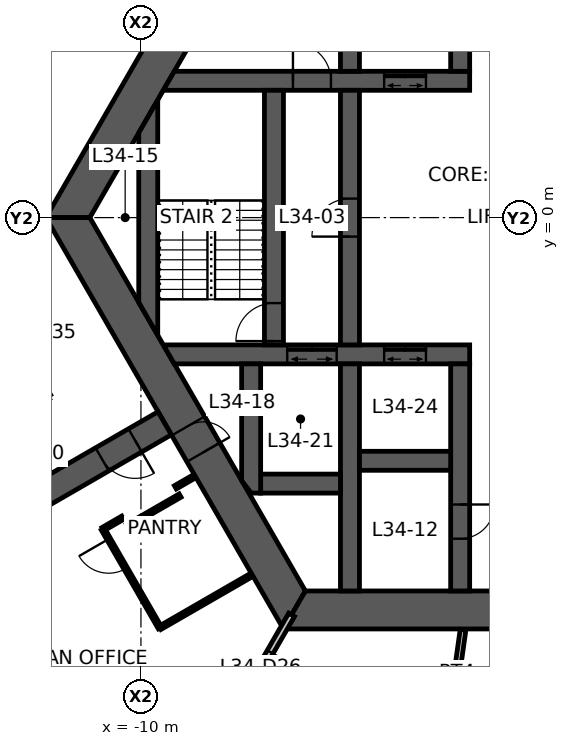
"""IFC4 building model, lengths in metres.
Left out: names, types, materials, properties, quantities, classifications, styles, units other than length and angle.
Written with IfcOpenShell. Run it as: python <this file> out.ifc"""

import sys

from ifc_helpers import new_model, si_unit, direction, frame, frame_2d, origin, place, context, subcontext, project, spatial, polyline, rectangle, outline, extrude, element, fill, save


model = new_model("IFC4")
c1 = context("Model", 3, precision=1e-05, world=origin(), true_north=direction((0.0, 1.0)))
c2 = subcontext(c1, "Body", "Model", "MODEL_VIEW")
j1 = project(units=[si_unit("LENGTHUNIT", "METRE"), si_unit("PLANEANGLEUNIT", "RADIAN")], contexts=[c1])
p1 = place(None, origin())
s1 = spatial("IfcSite", under=j1, at=p1, CompositionType="ELEMENT")
p2 = place(p1, origin())
s2 = spatial("IfcBuilding", under=s1, at=p2, CompositionType="ELEMENT")
p3 = place(p2, frame((0.0, 0.0, 137.0)))
s3 = spatial("IfcBuildingStorey", under=s2, at=p3, CompositionType="ELEMENT", Elevation=137.0)
p4 = place(p3, frame((-5.961, 10.325, 0.0), z_axis=(0.0, 0.0, 1.0), x_axis=(-0.500004296715, -0.866022923061, 0.0)))
e1 = element("IfcWall", 1, at=p4, inside=s3, PredefinedType="SHEAR", context=c2, shape_type="SweptSolid", body=[
    extrude(outline(polyline([(-0.289, -0.5), (4.494, -0.5), (5.494, -0.5), (12.211, -0.5), (11.634, 0.5), (5.494, 0.5), (4.494, 0.5), (0.289, 0.5), (-0.289, -0.5)])), origin(), (0.0, 0.0, 1.0), 3.9),
])
p5 = place(p4, frame((4.494, 0.0, 0.0)))
e2 = element("IfcOpeningElement", 2, at=p5, cuts=e1, PredefinedType="OPENING", context=c2, shape_type="SweptSolid", body=[
    extrude(rectangle(XDim=1.0, YDim=2.1, at=frame_2d((0.5, 1.05))), frame((0.0, 0.51, 0.0), z_axis=(0.0, -1.0, 0.0), x_axis=(1.0, 0.0, 0.0)), (0.0, 0.0, 1.0), 1.02),
])
p6 = place(p3, frame((-11.922, 0.0, 0.0), z_axis=(0.0, 0.0, 1.0), x_axis=(0.500004296715, -0.866022923061, 0.0)))
e3 = element("IfcWall", 3, at=p6, inside=s3, PredefinedType="SHEAR", context=c2, shape_type="SweptSolid", body=[
    extrude(outline(polyline([(-0.289, -0.5), (6.331, -0.5), (7.131, -0.5), (12.211, -0.5), (11.634, 0.5), (7.131, 0.5), (6.331, 0.5), (0.289, 0.5), (-0.289, -0.5)])), origin(), (0.0, 0.0, 1.0), 3.9),
])
p7 = place(p6, frame((6.331, 0.0, 0.0)))
e4 = element("IfcOpeningElement", 4, at=p7, cuts=e3, PredefinedType="OPENING", context=c2, shape_type="SweptSolid", body=[
    extrude(rectangle(XDim=0.8, YDim=2.1, at=frame_2d((0.4, 1.05))), frame((0.0, 0.51, 0.0), z_axis=(0.0, -1.0, 0.0), x_axis=(1.0, 0.0, 0.0)), (0.0, 0.0, 1.0), 1.02),
])
p8 = place(p3, frame((-5.961, -10.325, 0.0), z_axis=(0.0, 0.0, 1.0), x_axis=(1.0, 0.0, 0.0)))
e5 = element("IfcWall", 5, at=p8, inside=s3, PredefinedType="SHEAR", context=c2, shape_type="SweptSolid", body=[
    extrude(outline(polyline([(-0.289, -0.5), (5.461, -0.5), (6.461, -0.5), (12.211, -0.5), (11.634, 0.5), (6.461, 0.5), (5.461, 0.5), (0.289, 0.5), (-0.289, -0.5)])), origin(), (0.0, 0.0, 1.0), 3.9),
])
p9 = place(p8, frame((5.461, 0.0, 0.0)))
e6 = element("IfcOpeningElement", 6, at=p9, cuts=e5, PredefinedType="OPENING", context=c2, shape_type="SweptSolid", body=[
    extrude(rectangle(XDim=1.0, YDim=2.1, at=frame_2d((0.5, 1.05))), frame((0.0, 0.51, 0.0), z_axis=(0.0, -1.0, 0.0), x_axis=(1.0, 0.0, 0.0)), (0.0, 0.0, 1.0), 1.02),
])
p10 = place(p3, frame((-9.375, -5.413, 0.0), z_axis=(0.0, 0.0, 1.0), x_axis=(-0.866032377459, -0.499987921047, 0.0)))
e7 = element("IfcWall", 7, at=p10, inside=s3, PredefinedType="SHEAR", context=c2, shape_type="SweptSolid", body=[
    extrude(rectangle(XDim=7.696, YDim=0.7, at=frame_2d((3.848, 0.0))), origin(), (0.0, 0.0, 1.0), 3.9),
])
p11 = place(p10, frame((0.9, 0.0, 0.0)))
e8 = element("IfcOpeningElement", 8, at=p11, cuts=e7, PredefinedType="OPENING", context=c2, shape_type="SweptSolid", body=[
    extrude(rectangle(XDim=1.0, YDim=2.1, at=frame_2d((0.5, 1.05))), frame((0.0, 0.36, 0.0), z_axis=(0.0, -1.0, 0.0), x_axis=(1.0, 0.0, 0.0)), (0.0, 0.0, 1.0), 0.72),
])
p12 = place(p3, frame((-9.266, 3.6, 0.0), z_axis=(0.0, 0.0, 1.0), x_axis=(1.0, 0.0, 0.0)))
e9 = element("IfcWall", 9, at=p12, inside=s3, PredefinedType="SHEAR", context=c2, shape_type="SweptSolid", body=[
    extrude(outline(polyline([(-0.144, -0.25), (3.266, -0.25), (4.266, -0.25), (5.667, -0.25), (6.767, -0.25), (7.916, -0.25), (7.916, 0.25), (6.767, 0.25), (5.667, 0.25), (4.266, 0.25), (3.266, 0.25), (0.144, 0.25), (-0.144, -0.25)])), origin(), (0.0, 0.0, 1.0), 3.9),
])
p13 = place(p12, frame((3.266, 0.0, 0.0)))
e10 = element("IfcOpeningElement", 10, at=p13, cuts=e9, PredefinedType="OPENING", context=c2, shape_type="SweptSolid", body=[
    extrude(rectangle(XDim=1.0, YDim=2.1, at=frame_2d((0.5, 1.05))), frame((0.0, 0.26, 0.0), z_axis=(0.0, -1.0, 0.0), x_axis=(1.0, 0.0, 0.0)), (0.0, 0.0, 1.0), 0.52),
])
p14 = place(p12, frame((5.667, 0.0, 0.0)))
e11 = element("IfcOpeningElement", 11, at=p14, cuts=e9, PredefinedType="OPENING", context=c2, shape_type="SweptSolid", body=[
    extrude(rectangle(XDim=1.1, YDim=2.1, at=frame_2d((0.55, 1.05))), frame((0.0, 0.26, 0.0), z_axis=(0.0, -1.0, 0.0), x_axis=(1.0, 0.0, 0.0)), (0.0, 0.0, 1.0), 0.52),
])
p15 = place(p3, frame((-9.266, -3.6, 0.0), z_axis=(0.0, 0.0, 1.0), x_axis=(1.0, 0.0, 0.0)))
e12 = element("IfcWall", 12, at=p15, inside=s3, PredefinedType="SHEAR", context=c2, shape_type="SweptSolid", body=[
    extrude(outline(polyline([(0.144, -0.25), (3.116, -0.25), (4.417, -0.25), (5.667, -0.25), (6.767, -0.25), (7.916, -0.25), (7.916, 0.25), (6.767, 0.25), (5.667, 0.25), (4.417, 0.25), (3.116, 0.25), (-0.144, 0.25), (0.144, -0.25)])), origin(), (0.0, 0.0, 1.0), 3.9),
])
p16 = place(p15, frame((5.667, 0.0, 0.0)))
e13 = element("IfcOpeningElement", 13, at=p16, cuts=e12, PredefinedType="OPENING", context=c2, shape_type="SweptSolid", body=[
    extrude(rectangle(XDim=1.1, YDim=2.1, at=frame_2d((0.55, 1.05))), frame((0.0, 0.26, 0.0), z_axis=(0.0, -1.0, 0.0), x_axis=(1.0, 0.0, 0.0)), (0.0, 0.0, 1.0), 0.52),
])
p17 = place(p15, frame((3.116, 0.0, 0.0)))
e14 = element("IfcOpeningElement", 14, at=p17, cuts=e12, PredefinedType="OPENING", context=c2, shape_type="SweptSolid", body=[
    extrude(rectangle(XDim=1.3, YDim=2.1, at=frame_2d((0.65, 1.05))), frame((0.0, 0.26, 0.0), z_axis=(0.0, -1.0, 0.0), x_axis=(1.0, 0.0, 0.0)), (0.0, 0.0, 1.0), 0.52),
])
p18 = place(p3, frame((-1.6, 3.85, 0.0), z_axis=(0.0, 0.0, 1.0), x_axis=(0.0, 1.0, 0.0)))
e15 = element("IfcWall", 15, at=p18, inside=s3, PredefinedType="SHEAR", context=c2, shape_type="SweptSolid", body=[
    extrude(rectangle(XDim=5.975, YDim=0.5, at=frame_2d((2.987, 0.0))), origin(), (0.0, 0.0, 1.0), 3.9),
])
p19 = place(p18, frame((3.7, 0.0, 0.0)))
e16 = element("IfcOpeningElement", 16, at=p19, cuts=e15, PredefinedType="OPENING", context=c2, shape_type="SweptSolid", body=[
    extrude(rectangle(XDim=0.9, YDim=2.1, at=frame_2d((0.45, 1.05))), frame((0.0, 0.26, 0.0), z_axis=(0.0, -1.0, 0.0), x_axis=(1.0, 0.0, 0.0)), (0.0, 0.0, 1.0), 0.52),
])
p20 = place(p3, frame((-1.6, -3.85, 0.0), z_axis=(0.0, 0.0, 1.0), x_axis=(0.0, -1.0, 0.0)))
e17 = element("IfcWall", 17, at=p20, inside=s3, PredefinedType="SHEAR", context=c2, shape_type="SweptSolid", body=[
    extrude(rectangle(XDim=5.975, YDim=0.5, at=frame_2d((2.987, 0.0))), origin(), (0.0, 0.0, 1.0), 3.9),
])
p21 = place(p20, frame((3.7, 0.0, 0.0)))
e18 = element("IfcOpeningElement", 18, at=p21, cuts=e17, PredefinedType="OPENING", context=c2, shape_type="SweptSolid", body=[
    extrude(rectangle(XDim=0.9, YDim=2.1, at=frame_2d((0.45, 1.05))), frame((0.0, 0.26, 0.0), z_axis=(0.0, -1.0, 0.0), x_axis=(1.0, 0.0, 0.0)), (0.0, 0.0, 1.0), 0.52),
])
p22 = place(p3, frame((-4.5, -3.35, 0.0), z_axis=(0.0, 0.0, 1.0), x_axis=(0.0, 1.0, 0.0)))
e19 = element("IfcWall", 19, at=p22, inside=s3, PredefinedType="SHEAR", context=c2, shape_type="SweptSolid", body=[
    extrude(rectangle(XDim=6.7, YDim=0.5, at=frame_2d((3.35, 0.0))), origin(), (0.0, 0.0, 1.0), 3.9),
])
p23 = place(p22, frame((2.85, 0.0, 0.0)))
e20 = element("IfcOpeningElement", 20, at=p23, cuts=e19, PredefinedType="OPENING", context=c2, shape_type="SweptSolid", body=[
    extrude(rectangle(XDim=1.0, YDim=2.1, at=frame_2d((0.5, 1.05))), frame((0.0, 0.26, 0.0), z_axis=(0.0, -1.0, 0.0), x_axis=(1.0, 0.0, 0.0)), (0.0, 0.0, 1.0), 0.52),
])
p24 = place(p3, frame((-6.5, -3.35, 0.0), z_axis=(0.0, 0.0, 1.0), x_axis=(0.0, 1.0, 0.0)))
e21 = element("IfcWall", 21, at=p24, inside=s3, PredefinedType="SHEAR", context=c2, shape_type="SweptSolid", body=[
    extrude(rectangle(XDim=6.7, YDim=0.5, at=frame_2d((3.35, 0.0))), origin(), (0.0, 0.0, 1.0), 3.9),
])
p25 = place(p24, frame((0.1, 0.0, 0.0)))
e22 = element("IfcOpeningElement", 22, at=p25, cuts=e21, PredefinedType="OPENING", context=c2, shape_type="SweptSolid", body=[
    extrude(rectangle(XDim=1.0, YDim=2.1, at=frame_2d((0.5, 1.05))), frame((0.0, 0.26, 0.0), z_axis=(0.0, -1.0, 0.0), x_axis=(1.0, 0.0, 0.0)), (0.0, 0.0, 1.0), 0.52),
])
for number, where, z_axis, x_axis in (
    (23, (-4.5, 3.85, 0.0), (0.0, 0.0, 1.0), (0.0, 1.0, 0.0)),
    (24, (-4.5, -3.85, 0.0), (0.0, 0.0, 1.0), (0.0, -1.0, 0.0)),
):
    element("IfcWall", number, at=place(p3, frame(where, z_axis=z_axis, x_axis=x_axis)), inside=s3, PredefinedType="SHEAR", context=c2, shape_type="SweptSolid", body=[
        extrude(rectangle(XDim=5.975, YDim=0.5, at=frame_2d((2.987, 0.0))), origin(), (0.0, 0.0, 1.0), 3.9),
    ])
p26 = place(p3, frame((-4.25, -6.4, 0.0), z_axis=(0.0, 0.0, 1.0), x_axis=(1.0, 0.0, 0.0)))
e25 = element("IfcWall", 25, at=p26, inside=s3, PredefinedType="SHEAR", context=c2, shape_type="SweptSolid", body=[
    extrude(rectangle(XDim=2.4, YDim=0.5, at=frame_2d((1.2, 0.0))), origin(), (0.0, 0.0, 1.0), 3.9),
])
p27 = place(p3, frame((-6.85, -7.0, 0.0), z_axis=(0.0, 0.0, 1.0), x_axis=(1.0, 0.0, 0.0)))
e26 = element("IfcWall", 26, at=p27, inside=s3, PredefinedType="SHEAR", context=c2, shape_type="SweptSolid", body=[
    extrude(rectangle(XDim=2.1, YDim=0.5, at=frame_2d((1.05, 0.0))), origin(), (0.0, 0.0, 1.0), 3.9),
])
p28 = place(p3, frame((-7.1, -3.85, 0.0), z_axis=(0.0, 0.0, 1.0), x_axis=(0.0, -1.0, 0.0)))
e27 = element("IfcWall", 27, at=p28, inside=s3, PredefinedType="SHEAR", context=c2, shape_type="SweptSolid", body=[
    extrude(outline(polyline([(0.0, -0.25), (3.069, -0.25), (3.4, 0.0), (3.4, 0.25), (0.0, 0.25), (0.0, -0.25)])), origin(), (0.0, 0.0, 1.0), 3.9),
])
p29 = place(p3, frame((-9.808, -2.662, 0.0), z_axis=(0.0, 0.0, 1.0), x_axis=(0.0, 1.0, 0.0)))
e28 = element("IfcWall", 28, at=p29, inside=s3, PredefinedType="SHEAR", context=c2, shape_type="SweptSolid", body=[
    extrude(outline(polyline([(-0.433, -0.25), (5.758, -0.25), (4.892, 0.25), (0.433, 0.25), (-0.433, -0.25)])), origin(), (0.0, 0.0, 1.0), 3.9),
])
p30 = place(p3, frame((-6.035, -10.453, 0.0), z_axis=(0.0, 0.0, 1.0), x_axis=(-0.499989830942, -0.866031274813, 0.0)))
e29 = element("IfcWall", 29, at=p30, inside=s3, PredefinedType="PARTITIONING", context=c2, shape_type="SweptSolid", body=[
    extrude(rectangle(XDim=7.93, YDim=0.175, at=frame_2d((3.965, 0.0))), origin(), (0.0, 0.0, 1.0), 3.05),
])
p31 = place(p30, frame((1.13, 0.0, 0.0)))
e30 = element("IfcOpeningElement", 30, at=p31, cuts=e29, PredefinedType="OPENING", context=c2, shape_type="SweptSolid", body=[
    extrude(rectangle(XDim=1.0, YDim=2.1, at=frame_2d((0.5, 1.05))), frame((0.0, 0.098, 0.0), z_axis=(0.0, -1.0, 0.0), x_axis=(1.0, 0.0, 0.0)), (0.0, 0.0, 1.0), 0.195),
])
p32 = place(p3, frame((-12.908, 3.893, 0.0), z_axis=(0.0, 0.0, 1.0), x_axis=(0.500006411147, 0.866021702275, 0.0)))
e31 = element("IfcWall", 31, at=p32, inside=s3, PredefinedType="PARTITIONING", context=c2, shape_type="SweptSolid", body=[
    extrude(rectangle(XDim=7.095, YDim=0.15, at=frame_2d((3.548, 0.0))), origin(), (0.0, 0.0, 1.0), 2.95),
])
p33 = place(p32, frame((3.047, 0.0, 0.0)))
e32 = element("IfcOpeningElement", 32, at=p33, cuts=e31, PredefinedType="OPENING", context=c2, shape_type="SweptSolid", body=[
    extrude(rectangle(XDim=1.0, YDim=2.1, at=frame_2d((0.5, 1.05))), frame((0.0, 0.085, 0.0), z_axis=(0.0, -1.0, 0.0), x_axis=(1.0, 0.0, 0.0)), (0.0, 0.0, 1.0), 0.17),
])
p34 = place(p3, frame((-11.0, -8.198, 0.0), z_axis=(0.0, 0.0, 1.0), x_axis=(0.866131372301, 0.499816412211, 0.0)))
e33 = element("IfcWall", 33, at=p34, inside=s3, PredefinedType="PARTITIONING", context=c2, shape_type="SweptSolid", body=[
    extrude(rectangle(XDim=0.6, YDim=0.1, at=frame_2d((0.3, 0.0))), origin(), (0.0, 0.0, 1.0), 2.95),
])
p35 = place(p3, frame((-10.355, -8.115, 0.0), z_axis=(0.0, 0.0, 1.0), x_axis=(0.866094119867, 0.499880961361, 0.0)))
e34 = element("IfcWall", 34, at=p35, inside=s3, PredefinedType="PARTITIONING", context=c2, shape_type="SweptSolid", body=[
    extrude(rectangle(XDim=1.6, YDim=0.1, at=frame_2d((0.8, 0.0))), origin(), (0.0, 0.0, 1.0), 2.95),
])
p36 = place(p3, frame((-9.5, -10.796, 0.0), z_axis=(0.0, 0.0, 1.0), x_axis=(-0.499990139034, 0.866031096941, 0.0)))
e35 = element("IfcWall", 35, at=p36, inside=s3, PredefinedType="PARTITIONING", context=c2, shape_type="SweptSolid", body=[
    extrude(rectangle(XDim=3.0, YDim=0.1, at=frame_2d((1.5, 0.0))), origin(), (0.0, 0.0, 1.0), 2.95),
])
p37 = place(p36, frame((1.8, 0.0, 0.0)))
e36 = element("IfcOpeningElement", 36, at=p37, cuts=e35, PredefinedType="OPENING", context=c2, shape_type="SweptSolid", body=[
    extrude(rectangle(XDim=0.9, YDim=2.1, at=frame_2d((0.45, 1.05))), frame((0.0, 0.06, 0.0), z_axis=(0.0, -1.0, 0.0), x_axis=(1.0, 0.0, 0.0)), (0.0, 0.0, 1.0), 0.12),
])
p38 = place(p3, frame((-9.094, -7.098, 0.0), z_axis=(0.0, 0.0, 1.0), x_axis=(0.865954211699, 0.50012328804, 0.0)))
e37 = element("IfcWall", 37, at=p38, inside=s3, PredefinedType="PARTITIONING", context=c2, shape_type="SweptSolid", body=[
    extrude(rectangle(XDim=0.58, YDim=0.1, at=frame_2d((0.29, 0.0))), origin(), (0.0, 0.0, 1.0), 2.95),
])
p39 = place(p3, frame((-7.092, -9.406, 0.0), z_axis=(0.0, 0.0, 1.0), x_axis=(-0.86603494908, -0.499983466698, 0.0)))
e38 = element("IfcWall", 38, at=p39, inside=s3, PredefinedType="PARTITIONING", context=c2, shape_type="SweptSolid", body=[
    extrude(rectangle(XDim=2.78, YDim=0.1, at=frame_2d((1.39, 0.0))), origin(), (0.0, 0.0, 1.0), 2.95),
])
p40 = place(p3, frame((-1.844, -13.125, 0.0), z_axis=(0.0, 0.0, 1.0), x_axis=(0.139119980631, 0.990275532864, 0.0)))
e39 = element("IfcWall", 39, at=p40, inside=s3, PredefinedType="PARTITIONING", context=c2, shape_type="SweptSolid", body=[
    extrude(rectangle(XDim=2.302, YDim=0.15, at=frame_2d((1.151, 0.0))), origin(), (0.0, 0.0, 1.0), 2.95),
])
p41 = place(p7, origin())
e40 = element("IfcDoor", 40, at=p41, inside=s3, OperationType="SINGLE_SWING_RIGHT", PredefinedType="DOOR", context=c2, shape_type="SweptSolid", body=[
    extrude(rectangle(XDim=0.8, YDim=2.1, at=frame_2d((0.4, 1.05))), frame((0.0, 0.025, 0.0), z_axis=(0.0, -1.0, 0.0), x_axis=(1.0, 0.0, 0.0)), (0.0, 0.0, 1.0), 0.05),
])
fill(e4, e40)
p42 = place(p23, origin())
e41 = element("IfcDoor", 41, at=p42, inside=s3, OperationType="SINGLE_SWING_LEFT", PredefinedType="DOOR", context=c2, shape_type="SweptSolid", body=[
    extrude(rectangle(XDim=1.0, YDim=2.1, at=frame_2d((0.5, 1.05))), frame((0.0, 0.025, 0.0), z_axis=(0.0, -1.0, 0.0), x_axis=(1.0, 0.0, 0.0)), (0.0, 0.0, 1.0), 0.05),
])
fill(e20, e41)
p43 = place(p25, origin())
e42 = element("IfcDoor", 42, at=p43, inside=s3, OperationType="SINGLE_SWING_LEFT", PredefinedType="DOOR", context=c2, shape_type="SweptSolid", body=[
    extrude(rectangle(XDim=1.0, YDim=2.1, at=frame_2d((0.5, 1.05))), frame((0.0, 0.025, 0.0), z_axis=(0.0, -1.0, 0.0), x_axis=(1.0, 0.0, 0.0)), (0.0, 0.0, 1.0), 0.05),
])
fill(e22, e42)
p44 = place(p13, origin())
e43 = element("IfcDoor", 43, at=p44, inside=s3, OperationType="SINGLE_SWING_LEFT", PredefinedType="DOOR", context=c2, shape_type="SweptSolid", body=[
    extrude(rectangle(XDim=1.0, YDim=2.1, at=frame_2d((0.5, 1.05))), frame((0.0, 0.025, 0.0), z_axis=(0.0, -1.0, 0.0), x_axis=(1.0, 0.0, 0.0)), (0.0, 0.0, 1.0), 0.05),
])
fill(e10, e43)
p45 = place(p21, origin())
e44 = element("IfcDoor", 44, at=p45, inside=s3, OperationType="SINGLE_SWING_LEFT", PredefinedType="DOOR", context=c2, shape_type="SweptSolid", body=[
    extrude(rectangle(XDim=0.9, YDim=2.1, at=frame_2d((0.45, 1.05))), frame((0.0, 0.025, 0.0), z_axis=(0.0, -1.0, 0.0), x_axis=(1.0, 0.0, 0.0)), (0.0, 0.0, 1.0), 0.05),
])
fill(e18, e44)
p46 = place(p11, origin())
e45 = element("IfcDoor", 45, at=p46, inside=s3, OperationType="SINGLE_SWING_LEFT", PredefinedType="DOOR", context=c2, shape_type="SweptSolid", body=[
    extrude(rectangle(XDim=1.0, YDim=2.1, at=frame_2d((0.5, 1.05))), frame((0.0, 0.025, 0.0), z_axis=(0.0, -1.0, 0.0), x_axis=(1.0, 0.0, 0.0)), (0.0, 0.0, 1.0), 0.05),
])
fill(e8, e45)
p47 = place(p31, origin())
e46 = element("IfcDoor", 46, at=p47, inside=s3, OperationType="SINGLE_SWING_LEFT", PredefinedType="DOOR", context=c2, shape_type="SweptSolid", body=[
    extrude(rectangle(XDim=1.0, YDim=2.1, at=frame_2d((0.5, 1.05))), frame((0.0, 0.025, 0.0), z_axis=(0.0, -1.0, 0.0), x_axis=(1.0, 0.0, 0.0)), (0.0, 0.0, 1.0), 0.05),
])
fill(e30, e46)
p48 = place(p37, origin())
e47 = element("IfcDoor", 47, at=p48, inside=s3, OperationType="SINGLE_SWING_RIGHT", PredefinedType="DOOR", context=c2, shape_type="SweptSolid", body=[
    extrude(rectangle(XDim=0.9, YDim=2.1, at=frame_2d((0.45, 1.05))), frame((0.0, 0.025, 0.0), z_axis=(0.0, -1.0, 0.0), x_axis=(1.0, 0.0, 0.0)), (0.0, 0.0, 1.0), 0.05),
])
fill(e36, e47)
p49 = place(p14, origin())
e48 = element("IfcDoor", 48, at=p49, inside=s3, OperationType="DOUBLE_DOOR_SLIDING", PredefinedType="DOOR", context=c2, shape_type="SweptSolid", body=[
    extrude(rectangle(XDim=1.1, YDim=2.1, at=frame_2d((0.55, 1.05))), frame((0.0, 0.025, 0.0), z_axis=(0.0, -1.0, 0.0), x_axis=(1.0, 0.0, 0.0)), (0.0, 0.0, 1.0), 0.05),
])
fill(e11, e48)
p50 = place(p16, origin())
e49 = element("IfcDoor", 49, at=p50, inside=s3, OperationType="DOUBLE_DOOR_SLIDING", PredefinedType="DOOR", context=c2, shape_type="SweptSolid", body=[
    extrude(rectangle(XDim=1.1, YDim=2.1, at=frame_2d((0.55, 1.05))), frame((0.0, 0.025, 0.0), z_axis=(0.0, -1.0, 0.0), x_axis=(1.0, 0.0, 0.0)), (0.0, 0.0, 1.0), 0.05),
])
fill(e13, e49)
p51 = place(p17, origin())
e50 = element("IfcDoor", 50, at=p51, inside=s3, OperationType="DOUBLE_DOOR_SLIDING", PredefinedType="DOOR", context=c2, shape_type="SweptSolid", body=[
    extrude(rectangle(XDim=1.3, YDim=2.1, at=frame_2d((0.65, 1.05))), frame((0.0, 0.025, 0.0), z_axis=(0.0, -1.0, 0.0), x_axis=(1.0, 0.0, 0.0)), (0.0, 0.0, 1.0), 0.05),
])
fill(e14, e50)
save(model, sys.argv[1])
